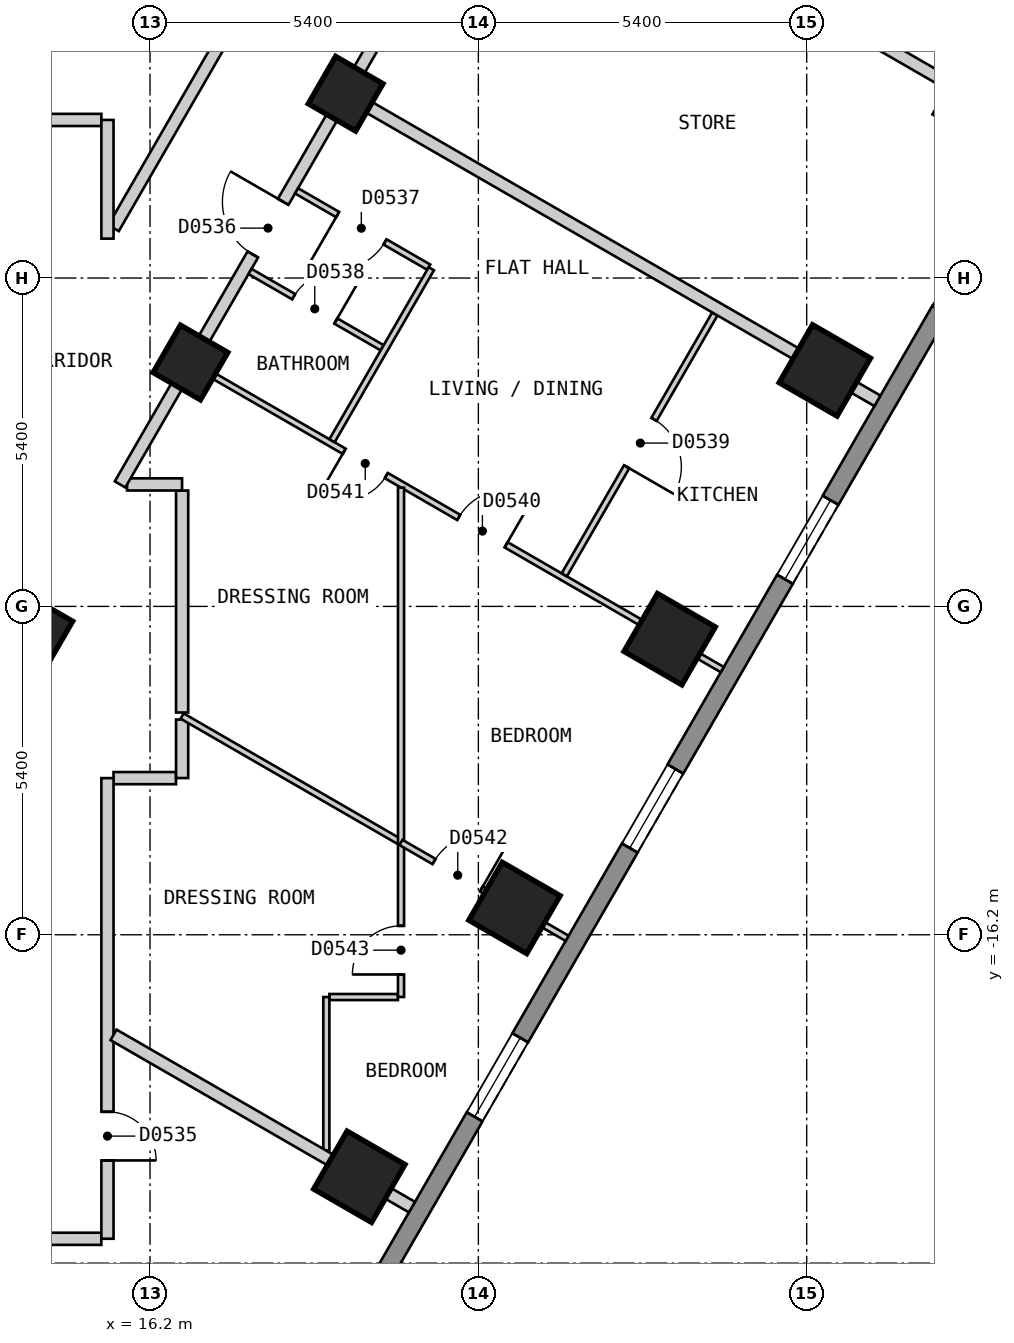
"""IFC4 building model, lengths in metres.
Left out: names, types, materials, properties, quantities, classifications, styles, units other than length and angle.
Written with IfcOpenShell. Run it as: python <this file> out.ifc"""

import sys

from ifc_helpers import new_model, si_unit, direction, frame, frame_2d, origin, origin_2d, place, context, subcontext, project, spatial, polyline, rectangle, outline, extrude, element, fill, save


model = new_model("IFC4")
c1 = context("Model", 3, precision=1e-05, world=origin(), true_north=direction((0.0, 1.0)))
c2 = subcontext(c1, "Body", "Model", "MODEL_VIEW")
j1 = project(units=[si_unit("LENGTHUNIT", "METRE"), si_unit("PLANEANGLEUNIT", "RADIAN")], contexts=[c1])
p1 = place(None, origin())
s1 = spatial("IfcSite", under=j1, at=p1, CompositionType="ELEMENT")
p2 = place(p1, origin())
s2 = spatial("IfcBuilding", under=s1, at=p2, CompositionType="ELEMENT")
p3 = place(p2, frame((0.0, 0.0, 56.4)))
s3 = spatial("IfcBuildingStorey", under=s2, at=p3, CompositionType="ELEMENT", Elevation=56.4)
for number, where, z_axis, x_axis in (
    (1, (19.642, -20.18, 0.0), (0.0, 0.0, 1.0), (0.5, 0.866, 0.0)),
    (2, (22.194, -15.759, 0.0), (0.0, 0.0, 1.0), (0.5, 0.866, 0.0)),
    (3, (24.746, -11.339, 0.0), (0.0, 0.0, 1.0), (0.5, 0.866, 0.0)),
    (4, (27.298, -6.919, 0.0), (0.0, 0.0, 1.0), (0.5, 0.866, 0.0)),
    (5, (29.849, -2.499, 0.0), (0.0, 0.0, 1.0), (0.5, 0.866, 0.0)),
):
    element("IfcColumn", number, at=place(p3, frame(where, z_axis=z_axis, x_axis=x_axis)), inside=s3, PredefinedType="COLUMN", context=c2, shape_type="SweptSolid", body=[
        extrude(rectangle(XDim=1.1, YDim=1.1, at=origin_2d()), origin(), (0.0, 0.0, 1.0), 3.0),
    ])
for number, where, z_axis, x_axis in (
    (6, (14.313, -11.209, 0.0), (0.0, 0.0, 1.0), (0.5, 0.866, 0.0)),
    (7, (16.865, -6.789, 0.0), (0.0, 0.0, 1.0), (0.5, 0.866, 0.0)),
    (8, (19.417, -2.369, 0.0), (0.0, 0.0, 1.0), (0.5, 0.866, 0.0)),
):
    element("IfcColumn", number, at=place(p3, frame(where, z_axis=z_axis, x_axis=x_axis)), inside=s3, PredefinedType="COLUMN", context=c2, shape_type="SweptSolid", body=[
        extrude(rectangle(XDim=0.9, YDim=0.9, at=origin_2d()), origin(), (0.0, 0.0, 1.0), 3.0),
    ])
p4 = place(p3, frame((17.71, -25.825, 0.0), z_axis=(0.0, 0.0, 1.0), x_axis=(0.500001938803, 0.866024284413, 0.0)))
e9 = element("IfcWall", 9, at=p4, inside=s3, PredefinedType="SOLIDWALL", context=c2, shape_type="SweptSolid", body=[
    extrude(outline(polyline([(0.0, -0.15), (27.02, -0.15), (26.94, 0.15), (0.08, 0.15), (0.0, -0.15)])), origin(), (0.0, 0.0, 1.0), 2.7),
])
p5 = place(p4, frame((2.553, 0.0, 0.15)))
e10 = element("IfcOpeningElement", 10, at=p5, cuts=e9, PredefinedType="OPENING", context=c2, shape_type="SweptSolid", body=[
    extrude(rectangle(XDim=1.5, YDim=2.1, at=frame_2d((0.75, 1.05))), frame((0.0, 0.16, 0.0), z_axis=(0.0, -1.0, 0.0), x_axis=(1.0, 0.0, 0.0)), (0.0, 0.0, 1.0), 0.32),
])
p6 = place(p4, frame((7.658, 0.0, 0.15)))
e11 = element("IfcOpeningElement", 11, at=p6, cuts=e9, PredefinedType="OPENING", context=c2, shape_type="SweptSolid", body=[
    extrude(rectangle(XDim=1.5, YDim=2.1, at=frame_2d((0.75, 1.05))), frame((0.0, 0.16, 0.0), z_axis=(0.0, -1.0, 0.0), x_axis=(1.0, 0.0, 0.0)), (0.0, 0.0, 1.0), 0.32),
])
p7 = place(p4, frame((12.761, 0.0, 0.15)))
e12 = element("IfcOpeningElement", 12, at=p7, cuts=e9, PredefinedType="OPENING", context=c2, shape_type="SweptSolid", body=[
    extrude(rectangle(XDim=1.5, YDim=2.1, at=frame_2d((0.75, 1.05))), frame((0.0, 0.16, 0.0), z_axis=(0.0, -1.0, 0.0), x_axis=(1.0, 0.0, 0.0)), (0.0, 0.0, 1.0), 0.32),
])
p8 = place(p4, frame((17.865, 0.0, 0.15)))
e13 = element("IfcOpeningElement", 13, at=p8, cuts=e9, PredefinedType="OPENING", context=c2, shape_type="SweptSolid", body=[
    extrude(rectangle(XDim=1.5, YDim=2.1, at=frame_2d((0.75, 1.05))), frame((0.0, 0.16, 0.0), z_axis=(0.0, -1.0, 0.0), x_axis=(1.0, 0.0, 0.0)), (0.0, 0.0, 1.0), 0.32),
])
p9 = place(p4, frame((22.969, 0.0, 0.15)))
e14 = element("IfcOpeningElement", 14, at=p9, cuts=e9, PredefinedType="OPENING", context=c2, shape_type="SweptSolid", body=[
    extrude(rectangle(XDim=1.5, YDim=2.1, at=frame_2d((0.75, 1.05))), frame((0.0, 0.16, 0.0), z_axis=(0.0, -1.0, 0.0), x_axis=(1.0, 0.0, 0.0)), (0.0, 0.0, 1.0), 0.32),
])
p10 = place(p3, frame((16.728, -8.895, 0.0), z_axis=(0.0, 0.0, 1.0), x_axis=(0.0, -1.0, 0.0)))
e15 = element("IfcWall", 15, at=p10, inside=s3, PredefinedType="PARTITIONING", context=c2, shape_type="SweptSolid", body=[
    extrude(rectangle(XDim=3.65, YDim=0.2, at=frame_2d((1.825, 0.0))), origin(), (0.0, 0.0, 1.0), 2.7),
])
p11 = place(p3, frame((15.822, -8.794, 0.0), z_axis=(0.0, 0.0, 1.0), x_axis=(1.0, 0.0, 0.0)))
e16 = element("IfcWall", 16, at=p11, inside=s3, PredefinedType="PARTITIONING", context=c2, shape_type="SweptSolid", body=[
    extrude(rectangle(XDim=0.905, YDim=0.2, at=frame_2d((0.453, 0.0))), origin(), (0.0, 0.0, 1.0), 2.7),
])
p12 = place(p3, frame((15.6, -13.624, 0.0), z_axis=(0.0, 0.0, 1.0), x_axis=(1.0, 0.0, 0.0)))
e17 = element("IfcWall", 17, at=p12, inside=s3, PredefinedType="PARTITIONING", context=c2, shape_type="SweptSolid", body=[
    extrude(rectangle(XDim=1.027, YDim=0.2, at=frame_2d((0.513, 0.0))), origin(), (0.0, 0.0, 1.0), 2.7),
])
p13 = place(p3, frame((-15.4, -21.2, 0.0), z_axis=(0.0, 0.0, 1.0), x_axis=(1.0, 0.0, 0.0)))
e18 = element("IfcWall", 18, at=p13, inside=s3, PredefinedType="PARTITIONING", context=c2, shape_type="SweptSolid", body=[
    extrude(rectangle(XDim=30.799, YDim=0.2, at=frame_2d((15.399, 0.0))), origin(), (0.0, 0.0, 1.0), 2.7),
])
p14 = place(p13, frame((4.985, 0.0, 0.0)))
e19 = element("IfcOpeningElement", 19, at=p14, cuts=e18, PredefinedType="OPENING", context=c2, shape_type="SweptSolid", body=[
    extrude(rectangle(XDim=0.9, YDim=2.1, at=frame_2d((0.45, 1.05))), frame((0.0, 0.11, 0.0), z_axis=(0.0, -1.0, 0.0), x_axis=(1.0, 0.0, 0.0)), (0.0, 0.0, 1.0), 0.22),
])
p15 = place(p13, frame((20.005, 0.0, 0.0)))
e20 = element("IfcOpeningElement", 20, at=p15, cuts=e18, PredefinedType="OPENING", context=c2, shape_type="SweptSolid", body=[
    extrude(rectangle(XDim=1.0, YDim=2.1, at=frame_2d((0.5, 1.05))), frame((0.0, 0.11, 0.0), z_axis=(0.0, -1.0, 0.0), x_axis=(1.0, 0.0, 0.0)), (0.0, 0.0, 1.0), 0.22),
])
p16 = place(p13, frame((24.916, 0.0, 0.0)))
e21 = element("IfcOpeningElement", 21, at=p16, cuts=e18, PredefinedType="OPENING", context=c2, shape_type="SweptSolid", body=[
    extrude(rectangle(XDim=0.9, YDim=2.1, at=frame_2d((0.45, 1.05))), frame((0.0, 0.11, 0.0), z_axis=(0.0, -1.0, 0.0), x_axis=(1.0, 0.0, 0.0)), (0.0, 0.0, 1.0), 0.22),
])
p17 = place(p3, frame((7.028, -2.8, 0.0), z_axis=(0.0, 0.0, 1.0), x_axis=(1.0, 0.0, 0.0)))
e22 = element("IfcWall", 22, at=p17, inside=s3, PredefinedType="PARTITIONING", context=c2, shape_type="SweptSolid", body=[
    extrude(rectangle(XDim=8.372, YDim=0.2, at=frame_2d((4.186, 0.0))), origin(), (0.0, 0.0, 1.0), 2.7),
])
p18 = place(p3, frame((15.6, -4.579, 0.0), z_axis=(0.0, 0.0, 1.0), x_axis=(0.499927597274, 0.866067201483, 0.0)))
e23 = element("IfcWall", 23, at=p18, inside=s3, PredefinedType="PARTITIONING", context=c2, shape_type="SweptSolid", body=[
    extrude(rectangle(XDim=5.288, YDim=0.2, at=frame_2d((2.644, 0.0))), origin(), (0.0, 0.0, 1.0), 2.7),
])
p19 = place(p3, frame((15.707, -8.794, 0.0), z_axis=(0.0, 0.0, 1.0), x_axis=(0.50000451406, 0.866022797575, 0.0)))
e24 = element("IfcWall", 24, at=p19, inside=s3, PredefinedType="PARTITIONING", context=c2, shape_type="SweptSolid", body=[
    extrude(rectangle(XDim=10.04, YDim=0.2, at=frame_2d((5.02, 0.0))), origin(), (0.0, 0.0, 1.0), 2.7),
])
p20 = place(p19, frame((4.367, 0.0, 0.0)))
e25 = element("IfcOpeningElement", 25, at=p20, cuts=e24, PredefinedType="OPENING", context=c2, shape_type="SweptSolid", body=[
    extrude(rectangle(XDim=1.0, YDim=2.1, at=frame_2d((0.5, 1.05))), frame((0.0, 0.11, 0.0), z_axis=(0.0, -1.0, 0.0), x_axis=(1.0, 0.0, 0.0)), (0.0, 0.0, 1.0), 0.22),
])
p21 = place(p19, frame((8.402, 0.0, 0.0)))
e26 = element("IfcOpeningElement", 26, at=p21, cuts=e24, PredefinedType="OPENING", context=c2, shape_type="SweptSolid", body=[
    extrude(rectangle(XDim=0.8, YDim=2.1, at=frame_2d((0.4, 1.05))), frame((0.0, 0.11, 0.0), z_axis=(0.0, -1.0, 0.0), x_axis=(1.0, 0.0, 0.0)), (0.0, 0.0, 1.0), 0.22),
])
p22 = place(p3, frame((15.5, -21.199, 0.0), z_axis=(0.0, 0.0, 1.0), x_axis=(0.0, 1.0, 0.0)))
e27 = element("IfcWall", 27, at=p22, inside=s3, PredefinedType="PARTITIONING", context=c2, shape_type="SweptSolid", body=[
    extrude(rectangle(XDim=7.575, YDim=0.2, at=frame_2d((3.788, 0.0))), origin(), (0.0, 0.0, 1.0), 2.7),
])
p23 = place(p22, frame((1.288, 0.0, 0.0)))
e28 = element("IfcOpeningElement", 28, at=p23, cuts=e27, PredefinedType="OPENING", context=c2, shape_type="SweptSolid", body=[
    extrude(rectangle(XDim=0.8, YDim=2.1, at=frame_2d((0.4, 1.05))), frame((0.0, 0.11, 0.0), z_axis=(0.0, -1.0, 0.0), x_axis=(1.0, 0.0, 0.0)), (0.0, 0.0, 1.0), 0.22),
])
p24 = place(p3, frame((15.5, -4.752, 0.0), z_axis=(0.0, 0.0, 1.0), x_axis=(0.0, 1.0, 0.0)))
e29 = element("IfcWall", 29, at=p24, inside=s3, PredefinedType="PARTITIONING", context=c2, shape_type="SweptSolid", body=[
    extrude(rectangle(XDim=1.952, YDim=0.2, at=frame_2d((0.976, 0.0))), origin(), (0.0, 0.0, 1.0), 2.7),
])
p25 = place(p3, frame((16.728, -13.623, 0.0), z_axis=(0.0, 0.0, 1.0), x_axis=(0.0, 1.0, 0.0)))
e30 = element("IfcWall", 30, at=p25, inside=s3, PredefinedType="PARTITIONING", context=c2, shape_type="SweptSolid", body=[
    extrude(rectangle(XDim=0.962, YDim=0.2, at=frame_2d((0.481, 0.0))), origin(), (0.0, 0.0, 1.0), 2.7),
])
p26 = place(p3, frame((16.728, -12.603, 0.0), z_axis=(0.0, 0.0, 1.0), x_axis=(0.865975293465, -0.500086783578, 0.0)))
e31 = element("IfcWall", 31, at=p26, inside=s3, PredefinedType="PARTITIONING", context=c2, shape_type="SweptSolid", body=[
    extrude(rectangle(XDim=4.157, YDim=0.1, at=frame_2d((2.079, 0.0))), origin(), (0.0, 0.0, 1.0), 2.7),
])
p27 = place(p3, frame((17.844, -5.292, 0.0), z_axis=(0.0, 0.0, 1.0), x_axis=(0.866038211682, -0.499977815414, 0.0)))
e32 = element("IfcWall", 32, at=p27, inside=s3, PredefinedType="PARTITIONING", context=c2, shape_type="SweptSolid", body=[
    extrude(rectangle(XDim=2.51, YDim=0.1, at=frame_2d((1.255, 0.0))), origin(), (0.0, 0.0, 1.0), 2.7),
])
p28 = place(p27, frame((0.83, 0.0, 0.0)))
e33 = element("IfcOpeningElement", 33, at=p28, cuts=e32, PredefinedType="OPENING", context=c2, shape_type="SweptSolid", body=[
    extrude(rectangle(XDim=0.8, YDim=2.1, at=frame_2d((0.4, 1.05))), frame((0.0, 0.06, 0.0), z_axis=(0.0, -1.0, 0.0), x_axis=(1.0, 0.0, 0.0)), (0.0, 0.0, 1.0), 0.12),
])
p29 = place(p3, frame((18.61, -3.966, 0.0), z_axis=(0.0, 0.0, 1.0), x_axis=(0.865958718457, -0.500115484592, 0.0)))
e34 = element("IfcWall", 34, at=p29, inside=s3, PredefinedType="PARTITIONING", context=c2, shape_type="SweptSolid", body=[
    extrude(rectangle(XDim=2.509, YDim=0.1, at=frame_2d((1.255, 0.0))), origin(), (0.0, 0.0, 1.0), 2.7),
])
p30 = place(p29, frame((0.78, 0.0, 0.0)))
e35 = element("IfcOpeningElement", 35, at=p30, cuts=e34, PredefinedType="OPENING", context=c2, shape_type="SweptSolid", body=[
    extrude(rectangle(XDim=0.9, YDim=2.1, at=frame_2d((0.45, 1.05))), frame((0.0, 0.06, 0.0), z_axis=(0.0, -1.0, 0.0), x_axis=(1.0, 0.0, 0.0)), (0.0, 0.0, 1.0), 0.12),
])
p31 = place(p3, frame((16.951, -6.839, 0.0), z_axis=(0.0, 0.0, 1.0), x_axis=(0.866022959057, -0.500004234368, 0.0)))
e36 = element("IfcWall", 36, at=p31, inside=s3, PredefinedType="PARTITIONING", context=c2, shape_type="SweptSolid", body=[
    extrude(rectangle(XDim=10.0, YDim=0.1, at=frame_2d((5.0, 0.0))), origin(), (0.0, 0.0, 1.0), 2.7),
])
p32 = place(p31, frame((4.995, 0.0, 0.0)))
e37 = element("IfcOpeningElement", 37, at=p32, cuts=e36, PredefinedType="OPENING", context=c2, shape_type="SweptSolid", body=[
    extrude(rectangle(XDim=0.9, YDim=2.1, at=frame_2d((0.45, 1.05))), frame((0.0, 0.06, 0.0), z_axis=(0.0, -1.0, 0.0), x_axis=(1.0, 0.0, 0.0)), (0.0, 0.0, 1.0), 0.12),
])
p33 = place(p31, frame((2.82, 0.0, 0.0)))
e38 = element("IfcOpeningElement", 38, at=p33, cuts=e36, PredefinedType="OPENING", context=c2, shape_type="SweptSolid", body=[
    extrude(rectangle(XDim=0.8, YDim=2.1, at=frame_2d((0.4, 1.05))), frame((0.0, 0.06, 0.0), z_axis=(0.0, -1.0, 0.0), x_axis=(1.0, 0.0, 0.0)), (0.0, 0.0, 1.0), 0.12),
])
p34 = place(p3, frame((19.15, -17.224, 0.0), z_axis=(0.0, 0.0, 1.0), x_axis=(1.0, 0.0, 0.0)))
e39 = element("IfcWall", 39, at=p34, inside=s3, PredefinedType="PARTITIONING", context=c2, shape_type="SweptSolid", body=[
    extrude(rectangle(XDim=1.127, YDim=0.1, at=frame_2d((0.563, 0.0))), origin(), (0.0, 0.0, 1.0), 2.7),
])
p35 = place(p3, frame((19.193, -8.076, 0.0), z_axis=(0.0, 0.0, 1.0), x_axis=(0.499901468276, 0.866082283629, 0.0)))
e40 = element("IfcWall", 40, at=p35, inside=s3, PredefinedType="PARTITIONING", context=c2, shape_type="SweptSolid", body=[
    extrude(rectangle(XDim=3.266, YDim=0.1, at=frame_2d((1.633, 0.0))), origin(), (0.0, 0.0, 1.0), 2.7),
])
p36 = place(p3, frame((23.013, -10.281, 0.0), z_axis=(0.0, 0.0, 1.0), x_axis=(0.499881743012, 0.866093668724, 0.0)))
e41 = element("IfcWall", 41, at=p36, inside=s3, PredefinedType="PARTITIONING", context=c2, shape_type="SweptSolid", body=[
    extrude(rectangle(XDim=4.953, YDim=0.1, at=frame_2d((2.477, 0.0))), origin(), (0.0, 0.0, 1.0), 2.7),
])
p37 = place(p36, frame((2.052, 0.0, 0.0)))
e42 = element("IfcOpeningElement", 42, at=p37, cuts=e41, PredefinedType="OPENING", context=c2, shape_type="SweptSolid", body=[
    extrude(rectangle(XDim=0.9, YDim=2.1, at=frame_2d((0.45, 1.05))), frame((0.0, 0.06, 0.0), z_axis=(0.0, -1.0, 0.0), x_axis=(1.0, 0.0, 0.0)), (0.0, 0.0, 1.0), 0.12),
])
p38 = place(p3, frame((19.1, -19.751, 0.0), z_axis=(0.0, 0.0, 1.0), x_axis=(0.0, 1.0, 0.0)))
e43 = element("IfcWall", 43, at=p38, inside=s3, PredefinedType="PARTITIONING", context=c2, shape_type="SweptSolid", body=[
    extrude(rectangle(XDim=2.527, YDim=0.1, at=frame_2d((1.263, 0.0))), origin(), (0.0, 0.0, 1.0), 2.7),
])
p39 = place(p3, frame((20.328, -17.223, 0.0), z_axis=(0.0, 0.0, 1.0), x_axis=(0.0, 1.0, 0.0)))
e44 = element("IfcWall", 44, at=p39, inside=s3, PredefinedType="PARTITIONING", context=c2, shape_type="SweptSolid", body=[
    extrude(rectangle(XDim=8.376, YDim=0.1, at=frame_2d((4.188, 0.0))), origin(), (0.0, 0.0, 1.0), 2.7),
])
p40 = place(p39, frame((0.37, 0.0, 0.0)))
e45 = element("IfcOpeningElement", 45, at=p40, cuts=e44, PredefinedType="OPENING", context=c2, shape_type="SweptSolid", body=[
    extrude(rectangle(XDim=0.8, YDim=2.1, at=frame_2d((0.4, 1.05))), frame((0.0, 0.06, 0.0), z_axis=(0.0, -1.0, 0.0), x_axis=(1.0, 0.0, 0.0)), (0.0, 0.0, 1.0), 0.12),
])
p41 = place(p3, frame((12.297, -21.3, 0.0), z_axis=(0.0, 0.0, 1.0), x_axis=(0.500056399578, -0.865992839024, 0.0)))
e46 = element("IfcWall", 46, at=p41, inside=s3, PredefinedType="PARTITIONING", context=c2, shape_type="SweptSolid", body=[
    extrude(rectangle(XDim=6.455, YDim=0.2, at=frame_2d((3.228, 0.0))), origin(), (0.0, 0.0, 1.0), 2.7),
])
p42 = place(p3, frame((15.6, -17.846, 0.0), z_axis=(0.0, 0.0, 1.0), x_axis=(0.866071523686, -0.499920109479, 0.0)))
e47 = element("IfcWall", 47, at=p42, inside=s3, PredefinedType="PARTITIONING", context=c2, shape_type="SweptSolid", body=[
    extrude(rectangle(XDim=5.667, YDim=0.2, at=frame_2d((2.833, 0.0))), origin(), (0.0, 0.0, 1.0), 2.7),
])
p43 = place(p3, frame((19.503, -2.419, 0.0), z_axis=(0.0, 0.0, 1.0), x_axis=(0.866022959057, -0.500004234368, 0.0)))
e48 = element("IfcWall", 48, at=p43, inside=s3, PredefinedType="PARTITIONING", context=c2, shape_type="SweptSolid", body=[
    extrude(rectangle(XDim=10.0, YDim=0.2, at=frame_2d((5.0, 0.0))), origin(), (0.0, 0.0, 1.0), 2.7),
])
p44 = place(p3, frame((25.693, -0.099, 0.0), z_axis=(0.0, 0.0, 1.0), x_axis=(0.866032775405, -0.499987231761, 0.0)))
e49 = element("IfcWall", 49, at=p44, inside=s3, PredefinedType="PARTITIONING", context=c2, shape_type="SweptSolid", body=[
    extrude(rectangle(XDim=5.8, YDim=0.2, at=frame_2d((2.9, 0.0))), origin(), (0.0, 0.0, 1.0), 2.7),
])
p45 = place(p3, frame((20.328, -14.682, 0.0), z_axis=(0.0, 0.0, 1.0), x_axis=(0.866063163075, -0.499934593286, 0.0)))
e50 = element("IfcWall", 50, at=p45, inside=s3, PredefinedType="PARTITIONING", context=c2, shape_type="SweptSolid", body=[
    extrude(rectangle(XDim=3.155, YDim=0.1, at=frame_2d((1.577, 0.0))), origin(), (0.0, 0.0, 1.0), 2.7),
])
p46 = place(p45, frame((0.627, 0.0, 0.0)))
e51 = element("IfcOpeningElement", 51, at=p46, cuts=e50, PredefinedType="OPENING", context=c2, shape_type="SweptSolid", body=[
    extrude(rectangle(XDim=0.9, YDim=2.1, at=frame_2d((0.45, 1.05))), frame((0.0, 0.06, 0.0), z_axis=(0.0, -1.0, 0.0), x_axis=(1.0, 0.0, 0.0)), (0.0, 0.0, 1.0), 0.12),
])
p47 = place(p6, origin())
e52 = element("IfcWindow", 52, at=p47, inside=s3, PartitioningType="SINGLE_PANEL", PredefinedType="WINDOW", context=c2, shape_type="SweptSolid", body=[
    extrude(rectangle(XDim=1.5, YDim=2.1, at=frame_2d((0.75, 1.05))), frame((0.0, 0.03, 0.0), z_axis=(0.0, -1.0, 0.0), x_axis=(1.0, 0.0, 0.0)), (0.0, 0.0, 1.0), 0.06),
])
fill(e11, e52)
p48 = place(p7, origin())
e53 = element("IfcWindow", 53, at=p48, inside=s3, PartitioningType="SINGLE_PANEL", PredefinedType="WINDOW", context=c2, shape_type="SweptSolid", body=[
    extrude(rectangle(XDim=1.5, YDim=2.1, at=frame_2d((0.75, 1.05))), frame((0.0, 0.03, 0.0), z_axis=(0.0, -1.0, 0.0), x_axis=(1.0, 0.0, 0.0)), (0.0, 0.0, 1.0), 0.06),
])
fill(e12, e53)
p49 = place(p8, origin())
e54 = element("IfcWindow", 54, at=p49, inside=s3, PartitioningType="SINGLE_PANEL", PredefinedType="WINDOW", context=c2, shape_type="SweptSolid", body=[
    extrude(rectangle(XDim=1.5, YDim=2.1, at=frame_2d((0.75, 1.05))), frame((0.0, 0.03, 0.0), z_axis=(0.0, -1.0, 0.0), x_axis=(1.0, 0.0, 0.0)), (0.0, 0.0, 1.0), 0.06),
])
fill(e13, e54)
p50 = place(p23, origin())
e55 = element("IfcDoor", 55, at=p50, inside=s3, OperationType="SINGLE_SWING_LEFT", PredefinedType="DOOR", context=c2, shape_type="SweptSolid", body=[
    extrude(rectangle(XDim=0.8, YDim=2.1, at=frame_2d((0.4, 1.05))), frame((0.0, 0.025, 0.0), z_axis=(0.0, -1.0, 0.0), x_axis=(1.0, 0.0, 0.0)), (0.0, 0.0, 1.0), 0.05),
])
fill(e28, e55)
p51 = place(p20, origin())
e56 = element("IfcDoor", 56, at=p51, inside=s3, OperationType="SINGLE_SWING_RIGHT", PredefinedType="DOOR", context=c2, shape_type="SweptSolid", body=[
    extrude(rectangle(XDim=1.0, YDim=2.1, at=frame_2d((0.5, 1.05))), frame((0.0, 0.025, 0.0), z_axis=(0.0, -1.0, 0.0), x_axis=(1.0, 0.0, 0.0)), (0.0, 0.0, 1.0), 0.05),
])
fill(e25, e56)
p52 = place(p30, origin())
e57 = element("IfcDoor", 57, at=p52, inside=s3, OperationType="SINGLE_SWING_LEFT", PredefinedType="DOOR", context=c2, shape_type="SweptSolid", body=[
    extrude(rectangle(XDim=0.9, YDim=2.1, at=frame_2d((0.45, 1.05))), frame((0.0, 0.025, 0.0), z_axis=(0.0, -1.0, 0.0), x_axis=(1.0, 0.0, 0.0)), (0.0, 0.0, 1.0), 0.05),
])
fill(e35, e57)
p53 = place(p28, origin())
e58 = element("IfcDoor", 58, at=p53, inside=s3, OperationType="SINGLE_SWING_RIGHT", PredefinedType="DOOR", context=c2, shape_type="SweptSolid", body=[
    extrude(rectangle(XDim=0.8, YDim=2.1, at=frame_2d((0.4, 1.05))), frame((0.0, 0.025, 0.0), z_axis=(0.0, -1.0, 0.0), x_axis=(1.0, 0.0, 0.0)), (0.0, 0.0, 1.0), 0.05),
])
fill(e33, e58)
p54 = place(p37, origin())
e59 = element("IfcDoor", 59, at=p54, inside=s3, OperationType="SINGLE_SWING_LEFT", PredefinedType="DOOR", context=c2, shape_type="SweptSolid", body=[
    extrude(rectangle(XDim=0.9, YDim=2.1, at=frame_2d((0.45, 1.05))), frame((0.0, 0.025, 0.0), z_axis=(0.0, -1.0, 0.0), x_axis=(1.0, 0.0, 0.0)), (0.0, 0.0, 1.0), 0.05),
])
fill(e42, e59)
p55 = place(p32, origin())
e60 = element("IfcDoor", 60, at=p55, inside=s3, OperationType="SINGLE_SWING_RIGHT", PredefinedType="DOOR", context=c2, shape_type="SweptSolid", body=[
    extrude(rectangle(XDim=0.9, YDim=2.1, at=frame_2d((0.45, 1.05))), frame((0.0, 0.025, 0.0), z_axis=(0.0, -1.0, 0.0), x_axis=(1.0, 0.0, 0.0)), (0.0, 0.0, 1.0), 0.05),
])
fill(e37, e60)
p56 = place(p33, origin())
e61 = element("IfcDoor", 61, at=p56, inside=s3, OperationType="SINGLE_SWING_LEFT", PredefinedType="DOOR", context=c2, shape_type="SweptSolid", body=[
    extrude(rectangle(XDim=0.8, YDim=2.1, at=frame_2d((0.4, 1.05))), frame((0.0, 0.025, 0.0), z_axis=(0.0, -1.0, 0.0), x_axis=(1.0, 0.0, 0.0)), (0.0, 0.0, 1.0), 0.05),
])
fill(e38, e61)
p57 = place(p46, origin())
e62 = element("IfcDoor", 62, at=p57, inside=s3, OperationType="SINGLE_SWING_RIGHT", PredefinedType="DOOR", context=c2, shape_type="SweptSolid", body=[
    extrude(rectangle(XDim=0.9, YDim=2.1, at=frame_2d((0.45, 1.05))), frame((0.0, 0.025, 0.0), z_axis=(0.0, -1.0, 0.0), x_axis=(1.0, 0.0, 0.0)), (0.0, 0.0, 1.0), 0.05),
])
fill(e51, e62)
p58 = place(p40, origin())
e63 = element("IfcDoor", 63, at=p58, inside=s3, OperationType="SINGLE_SWING_LEFT", PredefinedType="DOOR", context=c2, shape_type="SweptSolid", body=[
    extrude(rectangle(XDim=0.8, YDim=2.1, at=frame_2d((0.4, 1.05))), frame((0.0, 0.025, 0.0), z_axis=(0.0, -1.0, 0.0), x_axis=(1.0, 0.0, 0.0)), (0.0, 0.0, 1.0), 0.05),
])
fill(e45, e63)
save(model, sys.argv[1])
